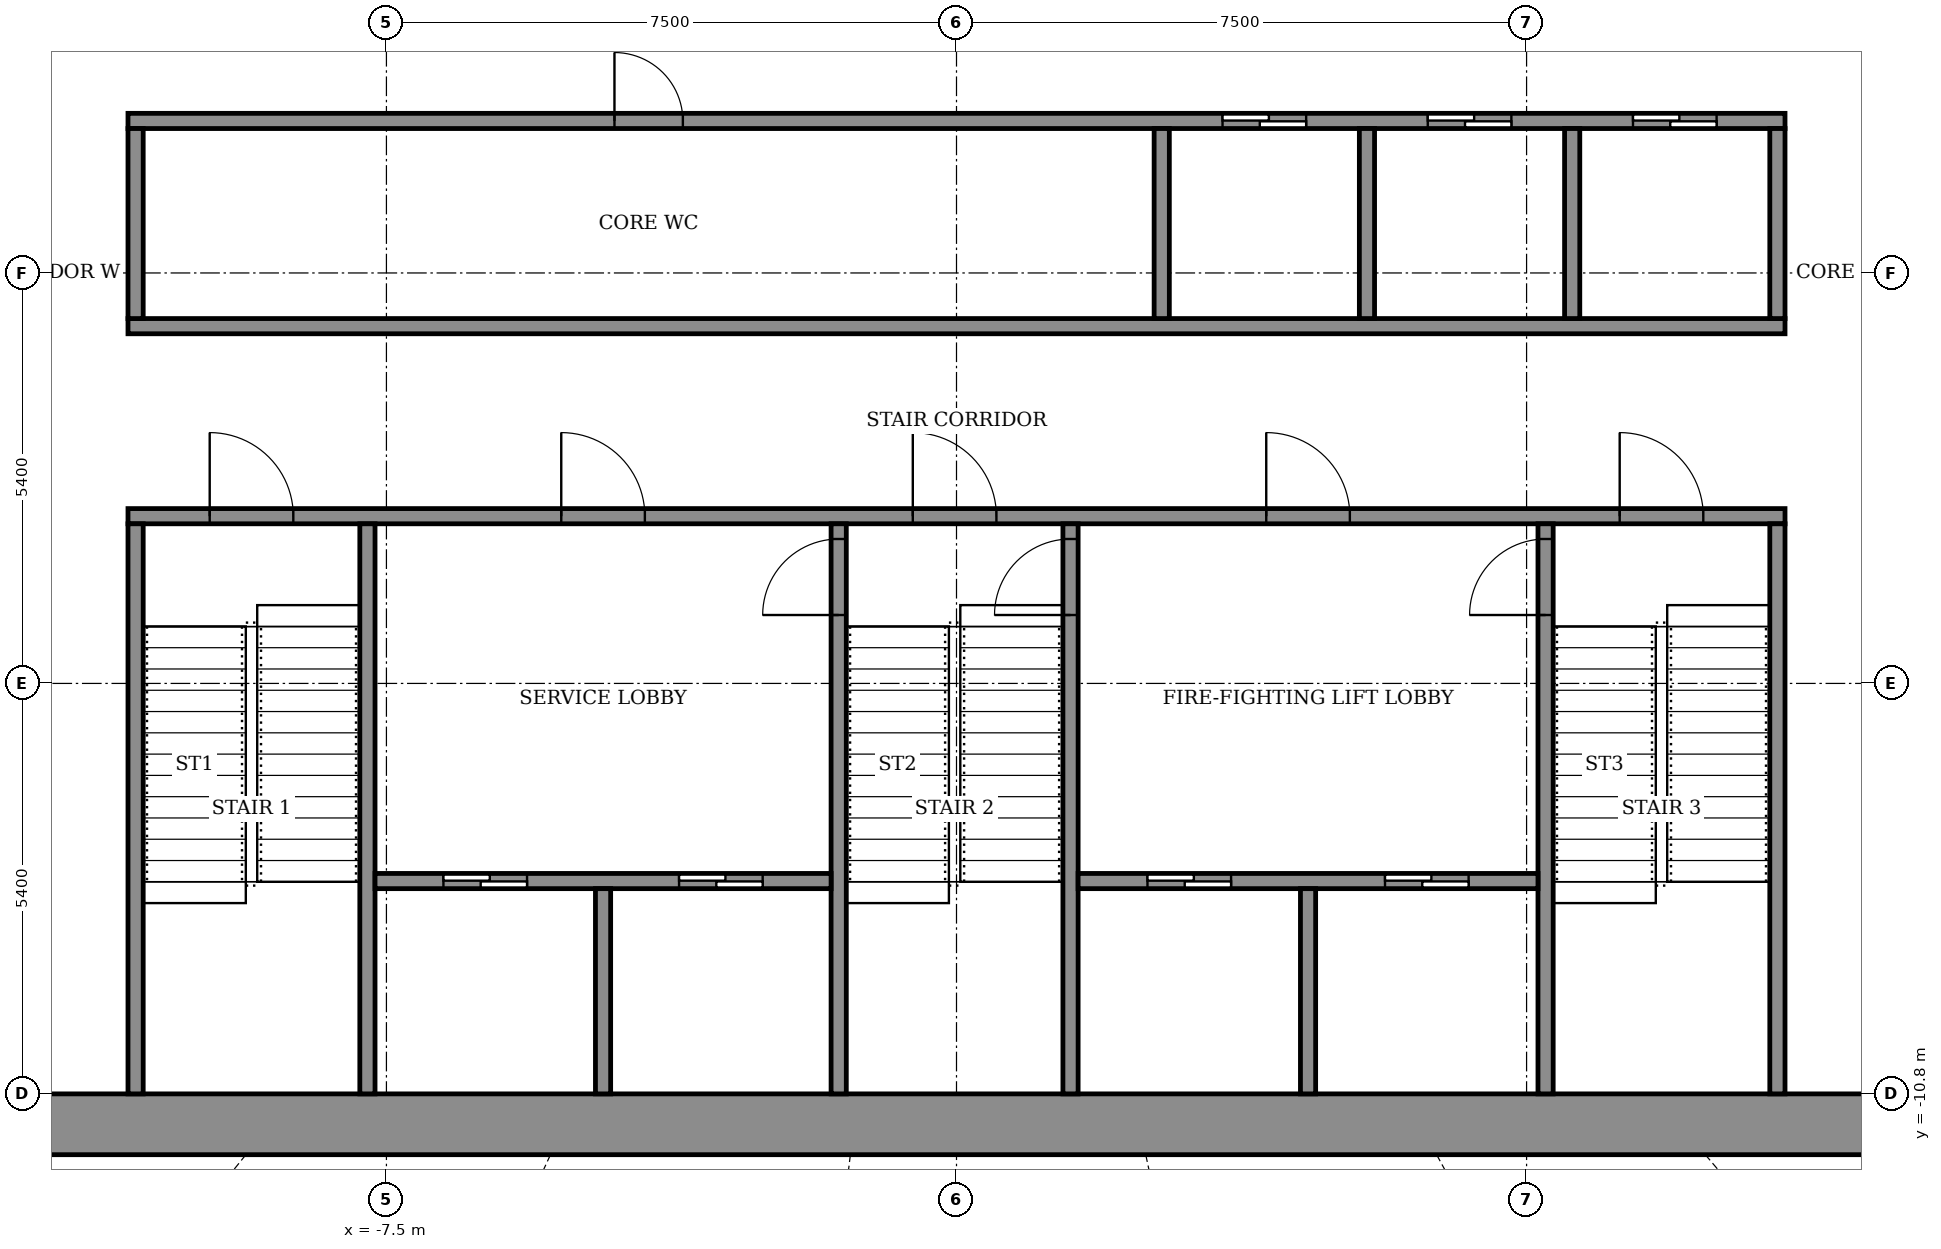
"""IFC4 building model, lengths in metres.
Left out: names, types, materials, properties, quantities, classifications, styles, units other than length and angle.
Written with IfcOpenShell. Run it as: python <this file> out.ifc"""

import sys

from ifc_helpers import new_model, si_unit, direction, frame, frame_2d, origin, place, context, subcontext, project, spatial, rectangle, extrude, element, fill, save


model = new_model("IFC4")
c1 = context("Model", 3, precision=1e-05, world=origin(), true_north=direction((0.0, 1.0)))
c2 = subcontext(c1, "Body", "Model", "MODEL_VIEW")
j1 = project(units=[si_unit("LENGTHUNIT", "METRE"), si_unit("PLANEANGLEUNIT", "RADIAN")], contexts=[c1])
p1 = place(None, origin())
s1 = spatial("IfcSite", under=j1, at=p1, CompositionType="ELEMENT")
p2 = place(p1, origin())
s2 = spatial("IfcBuilding", under=s1, at=p2, CompositionType="ELEMENT")
p3 = place(p2, frame((0.0, 0.0, 193.3)))
s3 = spatial("IfcBuildingStorey", under=s2, at=p3, CompositionType="ELEMENT", Elevation=193.3)
p4 = place(p3, frame((-14.6, -11.2, 0.0), z_axis=(0.0, 0.0, 1.0), x_axis=(1.0, 0.0, 0.0)))
e1 = element("IfcWall", 1, at=p4, inside=s3, PredefinedType="SHEAR", context=c2, shape_type="SweptSolid", body=[
    extrude(rectangle(XDim=29.2, YDim=0.8, at=frame_2d((14.6, 0.0))), origin(), (0.0, 0.0, 1.0), 4.6),
])
p5 = place(p3, frame((-10.9, -3.2, 0.0), z_axis=(0.0, 0.0, 1.0), x_axis=(1.0, 0.0, 0.0)))
e2 = element("IfcWall", 2, at=p5, inside=s3, PredefinedType="SHEAR", context=c2, shape_type="SweptSolid", body=[
    extrude(rectangle(XDim=21.8, YDim=0.2, at=frame_2d((10.9, 0.0))), origin(), (0.0, 0.0, 1.0), 4.05),
])
p6 = place(p5, frame((1.075, 0.0, 0.0)))
e3 = element("IfcOpeningElement", 3, at=p6, cuts=e2, PredefinedType="OPENING", context=c2, shape_type="SweptSolid", body=[
    extrude(rectangle(XDim=1.1, YDim=2.1, at=frame_2d((0.55, 1.05))), frame((0.0, 0.11, 0.0), z_axis=(0.0, -1.0, 0.0), x_axis=(1.0, 0.0, 0.0)), (0.0, 0.0, 1.0), 0.22),
])
p7 = place(p5, frame((10.325, 0.0, 0.0)))
e4 = element("IfcOpeningElement", 4, at=p7, cuts=e2, PredefinedType="OPENING", context=c2, shape_type="SweptSolid", body=[
    extrude(rectangle(XDim=1.1, YDim=2.1, at=frame_2d((0.55, 1.05))), frame((0.0, 0.11, 0.0), z_axis=(0.0, -1.0, 0.0), x_axis=(1.0, 0.0, 0.0)), (0.0, 0.0, 1.0), 0.22),
])
p8 = place(p5, frame((19.625, 0.0, 0.0)))
e5 = element("IfcOpeningElement", 5, at=p8, cuts=e2, PredefinedType="OPENING", context=c2, shape_type="SweptSolid", body=[
    extrude(rectangle(XDim=1.1, YDim=2.1, at=frame_2d((0.55, 1.05))), frame((0.0, 0.11, 0.0), z_axis=(0.0, -1.0, 0.0), x_axis=(1.0, 0.0, 0.0)), (0.0, 0.0, 1.0), 0.22),
])
p9 = place(p5, frame((5.7, 0.0, 0.0)))
e6 = element("IfcOpeningElement", 6, at=p9, cuts=e2, PredefinedType="OPENING", context=c2, shape_type="SweptSolid", body=[
    extrude(rectangle(XDim=1.1, YDim=2.1, at=frame_2d((0.55, 1.05))), frame((0.0, 0.11, 0.0), z_axis=(0.0, -1.0, 0.0), x_axis=(1.0, 0.0, 0.0)), (0.0, 0.0, 1.0), 0.22),
])
p10 = place(p5, frame((14.975, 0.0, 0.0)))
e7 = element("IfcOpeningElement", 7, at=p10, cuts=e2, PredefinedType="OPENING", context=c2, shape_type="SweptSolid", body=[
    extrude(rectangle(XDim=1.1, YDim=2.1, at=frame_2d((0.55, 1.05))), frame((0.0, 0.11, 0.0), z_axis=(0.0, -1.0, 0.0), x_axis=(1.0, 0.0, 0.0)), (0.0, 0.0, 1.0), 0.22),
])
p11 = place(p3, frame((-10.9, -0.7, 0.0), z_axis=(0.0, 0.0, 1.0), x_axis=(1.0, 0.0, 0.0)))
e8 = element("IfcWall", 8, at=p11, inside=s3, PredefinedType="SHEAR", context=c2, shape_type="SweptSolid", body=[
    extrude(rectangle(XDim=21.8, YDim=0.2, at=frame_2d((10.9, 0.0))), origin(), (0.0, 0.0, 1.0), 4.05),
])
p12 = place(p3, frame((-10.9, 2.0, 0.0), z_axis=(0.0, 0.0, 1.0), x_axis=(1.0, 0.0, 0.0)))
e9 = element("IfcWall", 9, at=p12, inside=s3, PredefinedType="SHEAR", context=c2, shape_type="SweptSolid", body=[
    extrude(rectangle(XDim=21.8, YDim=0.2, at=frame_2d((10.9, 0.0))), origin(), (0.0, 0.0, 1.0), 4.05),
])
p13 = place(p12, frame((14.4, 0.0, 0.0)))
e10 = element("IfcOpeningElement", 10, at=p13, cuts=e9, PredefinedType="OPENING", context=c2, shape_type="SweptSolid", body=[
    extrude(rectangle(XDim=1.1, YDim=2.1, at=frame_2d((0.55, 1.05))), frame((0.0, 0.11, 0.0), z_axis=(0.0, -1.0, 0.0), x_axis=(1.0, 0.0, 0.0)), (0.0, 0.0, 1.0), 0.22),
])
p14 = place(p12, frame((17.1, 0.0, 0.0)))
e11 = element("IfcOpeningElement", 11, at=p14, cuts=e9, PredefinedType="OPENING", context=c2, shape_type="SweptSolid", body=[
    extrude(rectangle(XDim=1.1, YDim=2.1, at=frame_2d((0.55, 1.05))), frame((0.0, 0.11, 0.0), z_axis=(0.0, -1.0, 0.0), x_axis=(1.0, 0.0, 0.0)), (0.0, 0.0, 1.0), 0.22),
])
p15 = place(p12, frame((19.8, 0.0, 0.0)))
e12 = element("IfcOpeningElement", 12, at=p15, cuts=e9, PredefinedType="OPENING", context=c2, shape_type="SweptSolid", body=[
    extrude(rectangle(XDim=1.1, YDim=2.1, at=frame_2d((0.55, 1.05))), frame((0.0, 0.11, 0.0), z_axis=(0.0, -1.0, 0.0), x_axis=(1.0, 0.0, 0.0)), (0.0, 0.0, 1.0), 0.22),
])
p16 = place(p12, frame((6.4, 0.0, 0.0)))
e13 = element("IfcOpeningElement", 13, at=p16, cuts=e9, PredefinedType="OPENING", context=c2, shape_type="SweptSolid", body=[
    extrude(rectangle(XDim=0.9, YDim=2.1, at=frame_2d((0.45, 1.05))), frame((0.0, 0.11, 0.0), z_axis=(0.0, -1.0, 0.0), x_axis=(1.0, 0.0, 0.0)), (0.0, 0.0, 1.0), 0.22),
])
for number, where, z_axis, x_axis in (
    (14, (-10.8, -10.8, 0.0), (0.0, 0.0, 1.0), (0.0, 1.0, 0.0)),
    (15, (-7.75, -10.8, 0.0), (0.0, 0.0, 1.0), (0.0, 1.0, 0.0)),
):
    element("IfcWall", number, at=place(p3, frame(where, z_axis=z_axis, x_axis=x_axis)), inside=s3, PredefinedType="SHEAR", context=c2, shape_type="SweptSolid", body=[
        extrude(rectangle(XDim=7.5, YDim=0.2, at=frame_2d((3.75, 0.0))), origin(), (0.0, 0.0, 1.0), 4.05),
    ])
p17 = place(p3, frame((-1.55, -10.8, 0.0), z_axis=(0.0, 0.0, 1.0), x_axis=(0.0, 1.0, 0.0)))
e16 = element("IfcWall", 16, at=p17, inside=s3, PredefinedType="SHEAR", context=c2, shape_type="SweptSolid", body=[
    extrude(rectangle(XDim=7.5, YDim=0.2, at=frame_2d((3.75, 0.0))), origin(), (0.0, 0.0, 1.0), 4.05),
])
p18 = place(p17, frame((6.3, 0.0, 0.0)))
e17 = element("IfcOpeningElement", 17, at=p18, cuts=e16, PredefinedType="OPENING", context=c2, shape_type="SweptSolid", body=[
    extrude(rectangle(XDim=1.0, YDim=2.1, at=frame_2d((0.5, 1.05))), frame((0.0, 0.11, 0.0), z_axis=(0.0, -1.0, 0.0), x_axis=(1.0, 0.0, 0.0)), (0.0, 0.0, 1.0), 0.22),
])
p19 = place(p3, frame((1.5, -10.8, 0.0), z_axis=(0.0, 0.0, 1.0), x_axis=(0.0, 1.0, 0.0)))
e18 = element("IfcWall", 18, at=p19, inside=s3, PredefinedType="SHEAR", context=c2, shape_type="SweptSolid", body=[
    extrude(rectangle(XDim=7.5, YDim=0.2, at=frame_2d((3.75, 0.0))), origin(), (0.0, 0.0, 1.0), 4.05),
])
p20 = place(p19, frame((6.3, 0.0, 0.0)))
e19 = element("IfcOpeningElement", 19, at=p20, cuts=e18, PredefinedType="OPENING", context=c2, shape_type="SweptSolid", body=[
    extrude(rectangle(XDim=1.0, YDim=2.1, at=frame_2d((0.5, 1.05))), frame((0.0, 0.11, 0.0), z_axis=(0.0, -1.0, 0.0), x_axis=(1.0, 0.0, 0.0)), (0.0, 0.0, 1.0), 0.22),
])
p21 = place(p3, frame((7.75, -10.8, 0.0), z_axis=(0.0, 0.0, 1.0), x_axis=(0.0, 1.0, 0.0)))
e20 = element("IfcWall", 20, at=p21, inside=s3, PredefinedType="SHEAR", context=c2, shape_type="SweptSolid", body=[
    extrude(rectangle(XDim=7.5, YDim=0.2, at=frame_2d((3.75, 0.0))), origin(), (0.0, 0.0, 1.0), 4.05),
])
p22 = place(p21, frame((6.3, 0.0, 0.0)))
e21 = element("IfcOpeningElement", 21, at=p22, cuts=e20, PredefinedType="OPENING", context=c2, shape_type="SweptSolid", body=[
    extrude(rectangle(XDim=1.0, YDim=2.1, at=frame_2d((0.5, 1.05))), frame((0.0, 0.11, 0.0), z_axis=(0.0, -1.0, 0.0), x_axis=(1.0, 0.0, 0.0)), (0.0, 0.0, 1.0), 0.22),
])
p23 = place(p3, frame((10.8, -10.8, 0.0), z_axis=(0.0, 0.0, 1.0), x_axis=(0.0, 1.0, 0.0)))
e22 = element("IfcWall", 22, at=p23, inside=s3, PredefinedType="SHEAR", context=c2, shape_type="SweptSolid", body=[
    extrude(rectangle(XDim=7.5, YDim=0.2, at=frame_2d((3.75, 0.0))), origin(), (0.0, 0.0, 1.0), 4.05),
])
p24 = place(p3, frame((-7.65, -8.0, 0.0), z_axis=(0.0, 0.0, 1.0), x_axis=(1.0, 0.0, 0.0)))
e23 = element("IfcWall", 23, at=p24, inside=s3, PredefinedType="SHEAR", context=c2, shape_type="SweptSolid", body=[
    extrude(rectangle(XDim=6.0, YDim=0.2, at=frame_2d((3.0, 0.0))), origin(), (0.0, 0.0, 1.0), 4.05),
])
p25 = place(p24, frame((0.9, 0.0, 0.0)))
e24 = element("IfcOpeningElement", 24, at=p25, cuts=e23, PredefinedType="OPENING", context=c2, shape_type="SweptSolid", body=[
    extrude(rectangle(XDim=1.1, YDim=2.1, at=frame_2d((0.55, 1.05))), frame((0.0, 0.11, 0.0), z_axis=(0.0, -1.0, 0.0), x_axis=(1.0, 0.0, 0.0)), (0.0, 0.0, 1.0), 0.22),
])
p26 = place(p24, frame((4.0, 0.0, 0.0)))
e25 = element("IfcOpeningElement", 25, at=p26, cuts=e23, PredefinedType="OPENING", context=c2, shape_type="SweptSolid", body=[
    extrude(rectangle(XDim=1.1, YDim=2.1, at=frame_2d((0.55, 1.05))), frame((0.0, 0.11, 0.0), z_axis=(0.0, -1.0, 0.0), x_axis=(1.0, 0.0, 0.0)), (0.0, 0.0, 1.0), 0.22),
])
p27 = place(p3, frame((-4.65, -10.8, 0.0), z_axis=(0.0, 0.0, 1.0), x_axis=(0.0, 1.0, 0.0)))
e26 = element("IfcWall", 26, at=p27, inside=s3, PredefinedType="SHEAR", context=c2, shape_type="SweptSolid", body=[
    extrude(rectangle(XDim=2.7, YDim=0.2, at=frame_2d((1.35, 0.0))), origin(), (0.0, 0.0, 1.0), 4.05),
])
p28 = place(p3, frame((1.6, -8.0, 0.0), z_axis=(0.0, 0.0, 1.0), x_axis=(1.0, 0.0, 0.0)))
e27 = element("IfcWall", 27, at=p28, inside=s3, PredefinedType="SHEAR", context=c2, shape_type="SweptSolid", body=[
    extrude(rectangle(XDim=6.05, YDim=0.2, at=frame_2d((3.025, 0.0))), origin(), (0.0, 0.0, 1.0), 4.05),
])
p29 = place(p28, frame((0.913, 0.0, 0.0)))
e28 = element("IfcOpeningElement", 28, at=p29, cuts=e27, PredefinedType="OPENING", context=c2, shape_type="SweptSolid", body=[
    extrude(rectangle(XDim=1.1, YDim=2.1, at=frame_2d((0.55, 1.05))), frame((0.0, 0.11, 0.0), z_axis=(0.0, -1.0, 0.0), x_axis=(1.0, 0.0, 0.0)), (0.0, 0.0, 1.0), 0.22),
])
p30 = place(p28, frame((4.038, 0.0, 0.0)))
e29 = element("IfcOpeningElement", 29, at=p30, cuts=e27, PredefinedType="OPENING", context=c2, shape_type="SweptSolid", body=[
    extrude(rectangle(XDim=1.1, YDim=2.1, at=frame_2d((0.55, 1.05))), frame((0.0, 0.11, 0.0), z_axis=(0.0, -1.0, 0.0), x_axis=(1.0, 0.0, 0.0)), (0.0, 0.0, 1.0), 0.22),
])
p31 = place(p3, frame((4.625, -10.8, 0.0), z_axis=(0.0, 0.0, 1.0), x_axis=(0.0, 1.0, 0.0)))
e30 = element("IfcWall", 30, at=p31, inside=s3, PredefinedType="SHEAR", context=c2, shape_type="SweptSolid", body=[
    extrude(rectangle(XDim=2.7, YDim=0.2, at=frame_2d((1.35, 0.0))), origin(), (0.0, 0.0, 1.0), 4.05),
])
p32 = place(p3, frame((-10.8, -0.6, 0.0), z_axis=(0.0, 0.0, 1.0), x_axis=(0.0, 1.0, 0.0)))
e31 = element("IfcWall", 31, at=p32, inside=s3, PredefinedType="STANDARD", context=c2, shape_type="SweptSolid", body=[
    extrude(rectangle(XDim=2.5, YDim=0.2, at=frame_2d((1.25, 0.0))), origin(), (0.0, 0.0, 1.0), 4.05),
])
for number, where, z_axis, x_axis in (
    (32, (2.7, -0.6, 0.0), (0.0, 0.0, 1.0), (0.0, 1.0, 0.0)),
    (33, (5.4, -0.6, 0.0), (0.0, 0.0, 1.0), (0.0, 1.0, 0.0)),
    (34, (8.1, -0.6, 0.0), (0.0, 0.0, 1.0), (0.0, 1.0, 0.0)),
    (35, (10.8, -0.6, 0.0), (0.0, 0.0, 1.0), (0.0, 1.0, 0.0)),
):
    element("IfcWall", number, at=place(p3, frame(where, z_axis=z_axis, x_axis=x_axis)), inside=s3, PredefinedType="SHEAR", context=c2, shape_type="SweptSolid", body=[
        extrude(rectangle(XDim=2.5, YDim=0.2, at=frame_2d((1.25, 0.0))), origin(), (0.0, 0.0, 1.0), 4.05),
    ])
p33 = place(p13, origin())
e36 = element("IfcDoor", 36, at=p33, inside=s3, OperationType="SLIDING_TO_LEFT", PredefinedType="DOOR", context=c2, shape_type="SweptSolid", body=[
    extrude(rectangle(XDim=1.1, YDim=2.1, at=frame_2d((0.55, 1.05))), frame((0.0, 0.025, 0.0), z_axis=(0.0, -1.0, 0.0), x_axis=(1.0, 0.0, 0.0)), (0.0, 0.0, 1.0), 0.05),
])
fill(e10, e36)
p34 = place(p14, origin())
e37 = element("IfcDoor", 37, at=p34, inside=s3, OperationType="SLIDING_TO_LEFT", PredefinedType="DOOR", context=c2, shape_type="SweptSolid", body=[
    extrude(rectangle(XDim=1.1, YDim=2.1, at=frame_2d((0.55, 1.05))), frame((0.0, 0.025, 0.0), z_axis=(0.0, -1.0, 0.0), x_axis=(1.0, 0.0, 0.0)), (0.0, 0.0, 1.0), 0.05),
])
fill(e11, e37)
p35 = place(p15, origin())
e38 = element("IfcDoor", 38, at=p35, inside=s3, OperationType="SLIDING_TO_LEFT", PredefinedType="DOOR", context=c2, shape_type="SweptSolid", body=[
    extrude(rectangle(XDim=1.1, YDim=2.1, at=frame_2d((0.55, 1.05))), frame((0.0, 0.025, 0.0), z_axis=(0.0, -1.0, 0.0), x_axis=(1.0, 0.0, 0.0)), (0.0, 0.0, 1.0), 0.05),
])
fill(e12, e38)
p36 = place(p16, origin())
e39 = element("IfcDoor", 39, at=p36, inside=s3, OperationType="SINGLE_SWING_RIGHT", PredefinedType="DOOR", context=c2, shape_type="SweptSolid", body=[
    extrude(rectangle(XDim=0.9, YDim=2.1, at=frame_2d((0.45, 1.05))), frame((0.0, 0.025, 0.0), z_axis=(0.0, -1.0, 0.0), x_axis=(1.0, 0.0, 0.0)), (0.0, 0.0, 1.0), 0.05),
])
fill(e13, e39)
p37 = place(p29, origin())
e40 = element("IfcDoor", 40, at=p37, inside=s3, OperationType="SLIDING_TO_LEFT", PredefinedType="DOOR", context=c2, shape_type="SweptSolid", body=[
    extrude(rectangle(XDim=1.1, YDim=2.1, at=frame_2d((0.55, 1.05))), frame((0.0, 0.025, 0.0), z_axis=(0.0, -1.0, 0.0), x_axis=(1.0, 0.0, 0.0)), (0.0, 0.0, 1.0), 0.05),
])
fill(e28, e40)
p38 = place(p25, origin())
e41 = element("IfcDoor", 41, at=p38, inside=s3, OperationType="SLIDING_TO_LEFT", PredefinedType="DOOR", context=c2, shape_type="SweptSolid", body=[
    extrude(rectangle(XDim=1.1, YDim=2.1, at=frame_2d((0.55, 1.05))), frame((0.0, 0.025, 0.0), z_axis=(0.0, -1.0, 0.0), x_axis=(1.0, 0.0, 0.0)), (0.0, 0.0, 1.0), 0.05),
])
fill(e24, e41)
p39 = place(p30, origin())
e42 = element("IfcDoor", 42, at=p39, inside=s3, OperationType="SLIDING_TO_LEFT", PredefinedType="DOOR", context=c2, shape_type="SweptSolid", body=[
    extrude(rectangle(XDim=1.1, YDim=2.1, at=frame_2d((0.55, 1.05))), frame((0.0, 0.025, 0.0), z_axis=(0.0, -1.0, 0.0), x_axis=(1.0, 0.0, 0.0)), (0.0, 0.0, 1.0), 0.05),
])
fill(e29, e42)
p40 = place(p26, origin())
e43 = element("IfcDoor", 43, at=p40, inside=s3, OperationType="SLIDING_TO_LEFT", PredefinedType="DOOR", context=c2, shape_type="SweptSolid", body=[
    extrude(rectangle(XDim=1.1, YDim=2.1, at=frame_2d((0.55, 1.05))), frame((0.0, 0.025, 0.0), z_axis=(0.0, -1.0, 0.0), x_axis=(1.0, 0.0, 0.0)), (0.0, 0.0, 1.0), 0.05),
])
fill(e25, e43)
p41 = place(p6, origin())
e44 = element("IfcDoor", 44, at=p41, inside=s3, OperationType="SINGLE_SWING_RIGHT", PredefinedType="DOOR", context=c2, shape_type="SweptSolid", body=[
    extrude(rectangle(XDim=1.1, YDim=2.1, at=frame_2d((0.55, 1.05))), frame((0.0, 0.025, 0.0), z_axis=(0.0, -1.0, 0.0), x_axis=(1.0, 0.0, 0.0)), (0.0, 0.0, 1.0), 0.05),
])
fill(e3, e44)
p42 = place(p7, origin())
e45 = element("IfcDoor", 45, at=p42, inside=s3, OperationType="SINGLE_SWING_RIGHT", PredefinedType="DOOR", context=c2, shape_type="SweptSolid", body=[
    extrude(rectangle(XDim=1.1, YDim=2.1, at=frame_2d((0.55, 1.05))), frame((0.0, 0.025, 0.0), z_axis=(0.0, -1.0, 0.0), x_axis=(1.0, 0.0, 0.0)), (0.0, 0.0, 1.0), 0.05),
])
fill(e4, e45)
p43 = place(p8, origin())
e46 = element("IfcDoor", 46, at=p43, inside=s3, OperationType="SINGLE_SWING_RIGHT", PredefinedType="DOOR", context=c2, shape_type="SweptSolid", body=[
    extrude(rectangle(XDim=1.1, YDim=2.1, at=frame_2d((0.55, 1.05))), frame((0.0, 0.025, 0.0), z_axis=(0.0, -1.0, 0.0), x_axis=(1.0, 0.0, 0.0)), (0.0, 0.0, 1.0), 0.05),
])
fill(e5, e46)
p44 = place(p9, origin())
e47 = element("IfcDoor", 47, at=p44, inside=s3, OperationType="SINGLE_SWING_LEFT", PredefinedType="DOOR", context=c2, shape_type="SweptSolid", body=[
    extrude(rectangle(XDim=1.1, YDim=2.1, at=frame_2d((0.55, 1.05))), frame((0.0, 0.025, 0.0), z_axis=(0.0, -1.0, 0.0), x_axis=(1.0, 0.0, 0.0)), (0.0, 0.0, 1.0), 0.05),
])
fill(e6, e47)
p45 = place(p10, origin())
e48 = element("IfcDoor", 48, at=p45, inside=s3, OperationType="SINGLE_SWING_LEFT", PredefinedType="DOOR", context=c2, shape_type="SweptSolid", body=[
    extrude(rectangle(XDim=1.1, YDim=2.1, at=frame_2d((0.55, 1.05))), frame((0.0, 0.025, 0.0), z_axis=(0.0, -1.0, 0.0), x_axis=(1.0, 0.0, 0.0)), (0.0, 0.0, 1.0), 0.05),
])
fill(e7, e48)
p46 = place(p18, origin())
e49 = element("IfcDoor", 49, at=p46, inside=s3, OperationType="SINGLE_SWING_RIGHT", PredefinedType="DOOR", context=c2, shape_type="SweptSolid", body=[
    extrude(rectangle(XDim=1.0, YDim=2.1, at=frame_2d((0.5, 1.05))), frame((0.0, 0.025, 0.0), z_axis=(0.0, -1.0, 0.0), x_axis=(1.0, 0.0, 0.0)), (0.0, 0.0, 1.0), 0.05),
])
fill(e17, e49)
p47 = place(p20, origin())
e50 = element("IfcDoor", 50, at=p47, inside=s3, OperationType="SINGLE_SWING_RIGHT", PredefinedType="DOOR", context=c2, shape_type="SweptSolid", body=[
    extrude(rectangle(XDim=1.0, YDim=2.1, at=frame_2d((0.5, 1.05))), frame((0.0, 0.025, 0.0), z_axis=(0.0, -1.0, 0.0), x_axis=(1.0, 0.0, 0.0)), (0.0, 0.0, 1.0), 0.05),
])
fill(e19, e50)
p48 = place(p22, origin())
e51 = element("IfcDoor", 51, at=p48, inside=s3, OperationType="SINGLE_SWING_RIGHT", PredefinedType="DOOR", context=c2, shape_type="SweptSolid", body=[
    extrude(rectangle(XDim=1.0, YDim=2.1, at=frame_2d((0.5, 1.05))), frame((0.0, 0.025, 0.0), z_axis=(0.0, -1.0, 0.0), x_axis=(1.0, 0.0, 0.0)), (0.0, 0.0, 1.0), 0.05),
])
fill(e21, e51)
save(model, sys.argv[1])
